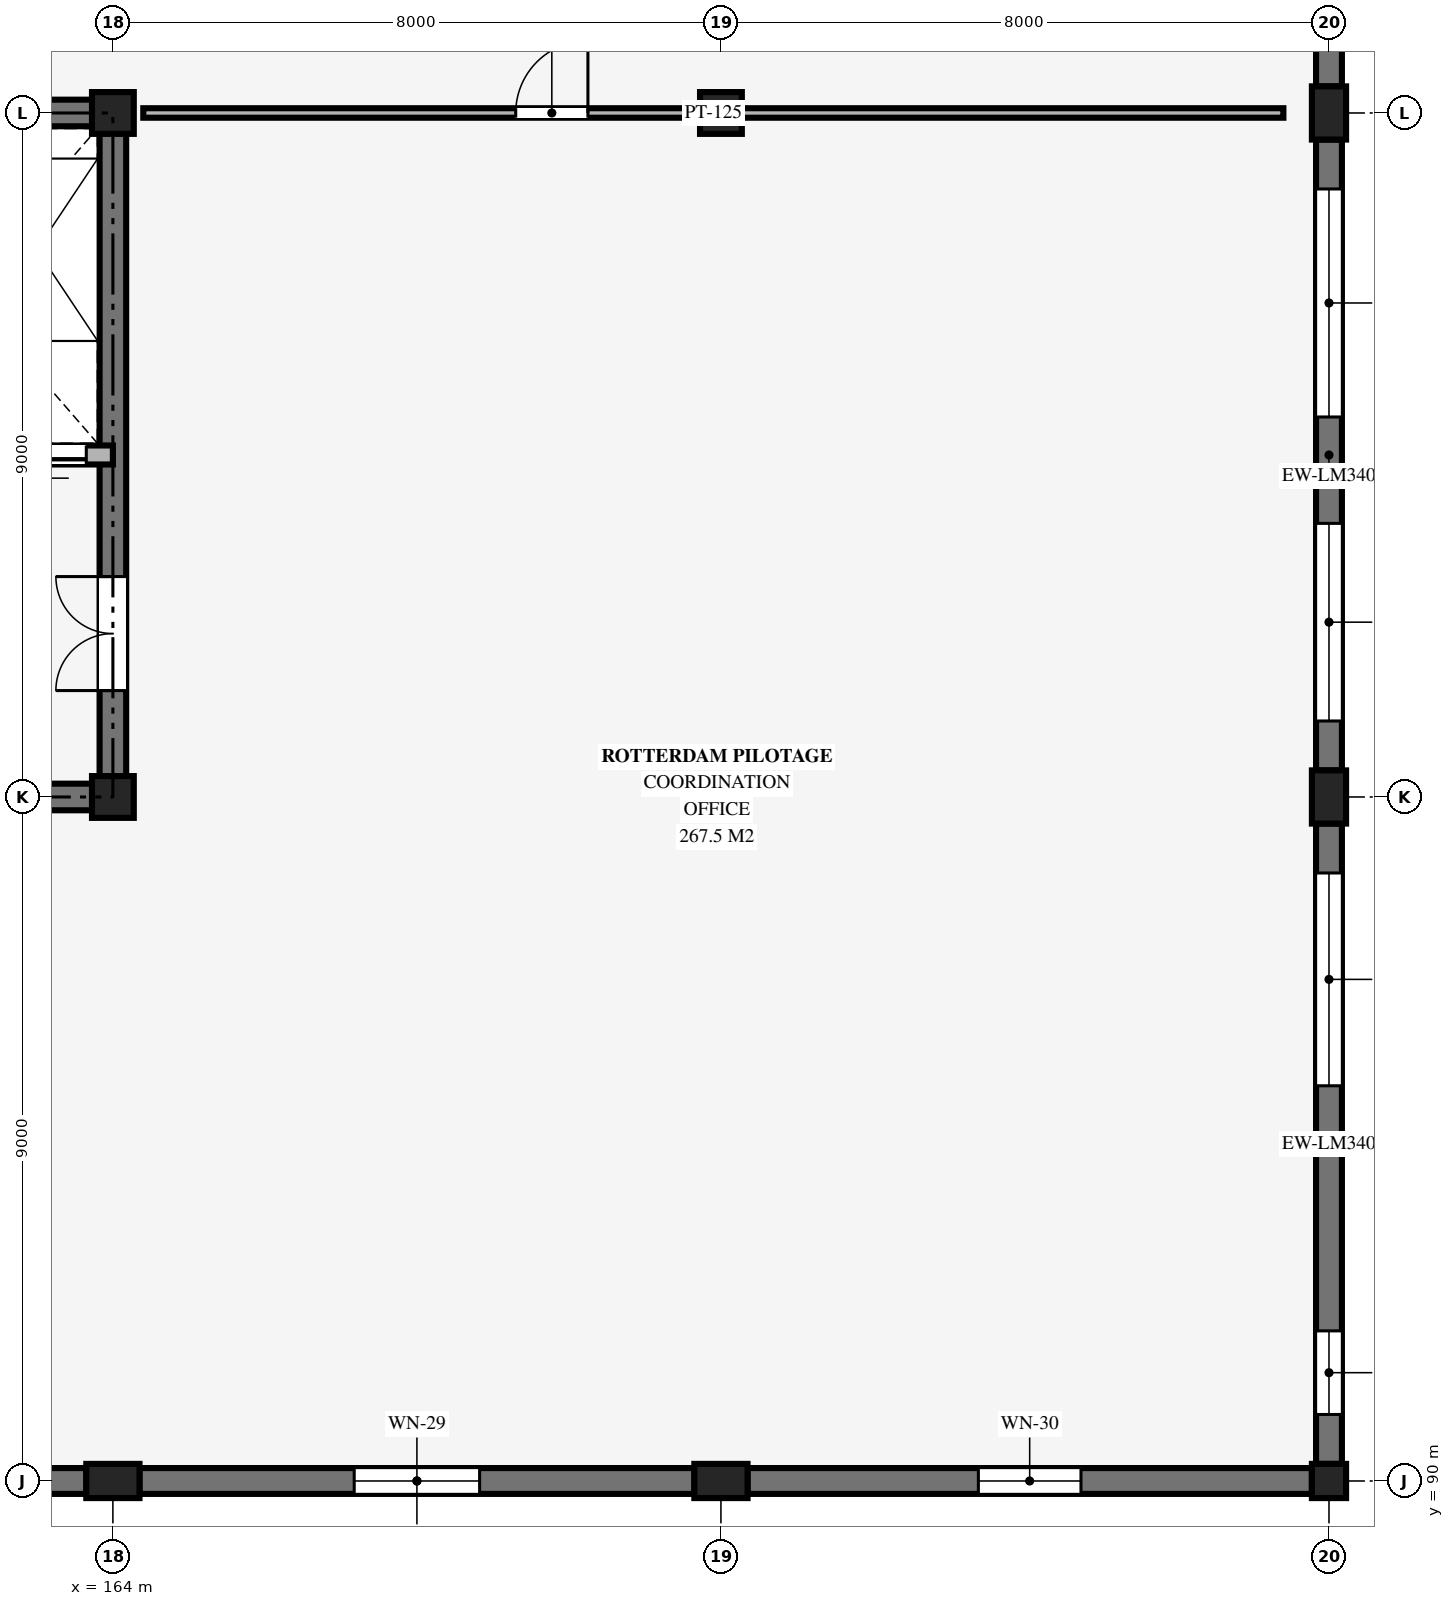
"""IFC4 building model, lengths in metres.
Left out: names, types, materials, properties, quantities, classifications, styles, units other than length and angle.
Written with IfcOpenShell. Run it as: python <this file> out.ifc"""

import sys

from ifc_helpers import new_model, si_unit, direction, frame, frame_2d, origin, origin_2d, place, context, subcontext, project, spatial, rectangle, extrude, element, fill, save


model = new_model("IFC4")
c1 = context("Model", 3, precision=1e-05, world=origin(), true_north=direction((0.0, 1.0)))
c2 = subcontext(c1, "Body", "Model", "MODEL_VIEW")
j1 = project(units=[si_unit("LENGTHUNIT", "METRE"), si_unit("PLANEANGLEUNIT", "RADIAN")], contexts=[c1])
p1 = place(None, origin())
s1 = spatial("IfcSite", under=j1, at=p1, CompositionType="ELEMENT")
p2 = place(p1, origin())
s2 = spatial("IfcBuilding", under=s1, at=p2, CompositionType="ELEMENT")
p3 = place(p2, frame((0.0, 0.0, 19.5)))
s3 = spatial("IfcBuildingStorey", under=s2, at=p3, CompositionType="ELEMENT", Elevation=19.5)
p4 = place(p3, frame((164.0, 90.0, 0.0), z_axis=(0.0, 0.0, 1.0), x_axis=(0.0, 1.0, 0.0)))
e1 = element("IfcColumn", 1, at=p4, inside=s3, PredefinedType="PILASTER", context=c2, shape_type="SweptSolid", body=[
    extrude(rectangle(XDim=0.45, YDim=0.7, at=origin_2d()), origin(), (0.0, 0.0, 1.0), 4.04),
])
for number, where, z_axis, x_axis in (
    (2, (164.0, 99.0, 0.0), (0.0, 0.0, 1.0), (1.0, 0.0, 0.0)),
    (3, (164.0, 108.0, 0.0), (0.0, 0.0, 1.0), (1.0, 0.0, 0.0)),
):
    element("IfcColumn", number, at=place(p3, frame(where, z_axis=z_axis, x_axis=x_axis)), inside=s3, PredefinedType="COLUMN", context=c2, shape_type="SweptSolid", body=[
        extrude(rectangle(XDim=0.55, YDim=0.55, at=origin_2d()), origin(), (0.0, 0.0, 1.0), 4.04),
    ])
p5 = place(p3, frame((172.0, 90.0, 0.0), z_axis=(0.0, 0.0, 1.0), x_axis=(0.0, 1.0, 0.0)))
e4 = element("IfcColumn", 4, at=p5, inside=s3, PredefinedType="PILASTER", context=c2, shape_type="SweptSolid", body=[
    extrude(rectangle(XDim=0.45, YDim=0.7, at=origin_2d()), origin(), (0.0, 0.0, 1.0), 4.04),
])
for number, where, z_axis, x_axis in (
    (5, (172.0, 99.0, 0.0), (0.0, 0.0, 1.0), (1.0, 0.0, 0.0)),
    (6, (172.0, 108.0, 0.0), (0.0, 0.0, 1.0), (1.0, 0.0, 0.0)),
):
    element("IfcColumn", number, at=place(p3, frame(where, z_axis=z_axis, x_axis=x_axis)), inside=s3, PredefinedType="COLUMN", context=c2, shape_type="SweptSolid", body=[
        extrude(rectangle(XDim=0.55, YDim=0.55, at=origin_2d()), origin(), (0.0, 0.0, 1.0), 4.04),
    ])
p6 = place(p3, frame((180.0, 90.0, 0.0), z_axis=(0.0, 0.0, 1.0), x_axis=(1.0, 0.0, 0.0)))
e7 = element("IfcColumn", 7, at=p6, inside=s3, PredefinedType="COLUMN", context=c2, shape_type="SweptSolid", body=[
    extrude(rectangle(XDim=0.45, YDim=0.45, at=origin_2d()), origin(), (0.0, 0.0, 1.0), 4.04),
])
for number, where, z_axis, x_axis in (
    (8, (180.0, 99.0, 0.0), (0.0, 0.0, 1.0), (1.0, 0.0, 0.0)),
    (9, (180.0, 108.0, 0.0), (0.0, 0.0, 1.0), (1.0, 0.0, 0.0)),
):
    element("IfcColumn", number, at=place(p3, frame(where, z_axis=z_axis, x_axis=x_axis)), inside=s3, PredefinedType="PILASTER", context=c2, shape_type="SweptSolid", body=[
        extrude(rectangle(XDim=0.45, YDim=0.7, at=origin_2d()), origin(), (0.0, 0.0, 1.0), 4.04),
    ])
p7 = place(p3, frame((180.0, 90.225, 0.0), z_axis=(0.0, 0.0, 1.0), x_axis=(0.0, 1.0, 0.0)))
e10 = element("IfcWall", 10, at=p7, inside=s3, PredefinedType="SOLIDWALL", context=c2, shape_type="SweptSolid", body=[
    extrude(rectangle(XDim=8.425, YDim=0.34, at=frame_2d((4.212, 0.0))), origin(), (0.0, 0.0, 1.0), 3.94),
])
p8 = place(p7, frame((0.65, 0.0, 0.95)))
e11 = element("IfcOpeningElement", 11, at=p8, cuts=e10, PredefinedType="OPENING", context=c2, shape_type="SweptSolid", body=[
    extrude(rectangle(XDim=1.1, YDim=1.1, at=frame_2d((0.55, 0.55))), frame((0.0, 0.18, 0.0), z_axis=(0.0, -1.0, 0.0), x_axis=(1.0, 0.0, 0.0)), (0.0, 0.0, 1.0), 0.36),
])
p9 = place(p7, frame((4.975, 0.0, 0.95)))
e12 = element("IfcOpeningElement", 12, at=p9, cuts=e10, PredefinedType="OPENING", context=c2, shape_type="SweptSolid", body=[
    extrude(rectangle(XDim=2.8, YDim=2.0, at=frame_2d((1.4, 1.0))), frame((0.0, 0.18, 0.0), z_axis=(0.0, -1.0, 0.0), x_axis=(1.0, 0.0, 0.0)), (0.0, 0.0, 1.0), 0.36),
])
p10 = place(p3, frame((180.0, 99.35, 0.0), z_axis=(0.0, 0.0, 1.0), x_axis=(0.0, 1.0, 0.0)))
e13 = element("IfcWall", 13, at=p10, inside=s3, PredefinedType="SOLIDWALL", context=c2, shape_type="SweptSolid", body=[
    extrude(rectangle(XDim=8.3, YDim=0.34, at=frame_2d((4.15, 0.0))), origin(), (0.0, 0.0, 1.0), 3.94),
])
p11 = place(p10, frame((0.65, 0.0, 0.95)))
e14 = element("IfcOpeningElement", 14, at=p11, cuts=e13, PredefinedType="OPENING", context=c2, shape_type="SweptSolid", body=[
    extrude(rectangle(XDim=2.6, YDim=1.6, at=frame_2d((1.3, 0.8))), frame((0.0, 0.18, 0.0), z_axis=(0.0, -1.0, 0.0), x_axis=(1.0, 0.0, 0.0)), (0.0, 0.0, 1.0), 0.36),
])
p12 = place(p10, frame((4.65, 0.0, 0.95)))
e15 = element("IfcOpeningElement", 15, at=p12, cuts=e13, PredefinedType="OPENING", context=c2, shape_type="SweptSolid", body=[
    extrude(rectangle(XDim=3.0, YDim=1.4, at=frame_2d((1.5, 0.7))), frame((0.0, 0.18, 0.0), z_axis=(0.0, -1.0, 0.0), x_axis=(1.0, 0.0, 0.0)), (0.0, 0.0, 1.0), 0.36),
])
p13 = place(p3, frame((180.0, 108.35, 0.0), z_axis=(0.0, 0.0, 1.0), x_axis=(0.0, 1.0, 0.0)))
e16 = element("IfcWall", 16, at=p13, inside=s3, PredefinedType="SOLIDWALL", context=c2, shape_type="SweptSolid", body=[
    extrude(rectangle(XDim=8.3, YDim=0.34, at=frame_2d((4.15, 0.0))), origin(), (0.0, 0.0, 1.0), 3.94),
])
p14 = place(p13, frame((0.65, 0.0, 0.95)))
e17 = element("IfcOpeningElement", 17, at=p14, cuts=e16, PredefinedType="OPENING", context=c2, shape_type="SweptSolid", body=[
    extrude(rectangle(XDim=2.0, YDim=1.2, at=frame_2d((1.0, 0.6))), frame((0.0, 0.18, 0.0), z_axis=(0.0, -1.0, 0.0), x_axis=(1.0, 0.0, 0.0)), (0.0, 0.0, 1.0), 0.36),
])
p15 = place(p13, frame((6.05, 0.0, 0.95)))
e18 = element("IfcOpeningElement", 18, at=p15, cuts=e16, PredefinedType="OPENING", context=c2, shape_type="SweptSolid", body=[
    extrude(rectangle(XDim=1.6, YDim=2.0, at=frame_2d((0.8, 1.0))), frame((0.0, 0.18, 0.0), z_axis=(0.0, -1.0, 0.0), x_axis=(1.0, 0.0, 0.0)), (0.0, 0.0, 1.0), 0.36),
])
p16 = place(p3, frame((163.65, 90.0, 0.0), z_axis=(0.0, 0.0, 1.0), x_axis=(-1.0, 0.0, 0.0)))
e19 = element("IfcWall", 19, at=p16, inside=s3, PredefinedType="SOLIDWALL", context=c2, shape_type="SweptSolid", body=[
    extrude(rectangle(XDim=7.3, YDim=0.34, at=frame_2d((3.65, 0.0))), origin(), (0.0, 0.0, 1.0), 3.94),
])
p17 = place(p16, frame((2.5, 0.0, 1.0)))
e20 = element("IfcOpeningElement", 20, at=p17, cuts=e19, PredefinedType="OPENING", context=c2, shape_type="SweptSolid", body=[
    extrude(rectangle(XDim=2.3, YDim=1.5, at=frame_2d((1.15, 0.75))), frame((0.0, 0.18, 0.0), z_axis=(0.0, -1.0, 0.0), x_axis=(1.0, 0.0, 0.0)), (0.0, 0.0, 1.0), 0.36),
])
p18 = place(p3, frame((171.65, 90.0, 0.0), z_axis=(0.0, 0.0, 1.0), x_axis=(-1.0, 0.0, 0.0)))
e21 = element("IfcWall", 21, at=p18, inside=s3, PredefinedType="SOLIDWALL", context=c2, shape_type="SweptSolid", body=[
    extrude(rectangle(XDim=7.3, YDim=0.34, at=frame_2d((3.65, 0.0))), origin(), (0.0, 0.0, 1.0), 3.94),
])
p19 = place(p18, frame((2.825, 0.0, 1.0)))
e22 = element("IfcOpeningElement", 22, at=p19, cuts=e21, PredefinedType="OPENING", context=c2, shape_type="SweptSolid", body=[
    extrude(rectangle(XDim=1.65, YDim=1.35, at=frame_2d((0.825, 0.675))), frame((0.0, 0.18, 0.0), z_axis=(0.0, -1.0, 0.0), x_axis=(1.0, 0.0, 0.0)), (0.0, 0.0, 1.0), 0.36),
])
p20 = place(p3, frame((179.775, 90.0, 0.0), z_axis=(0.0, 0.0, 1.0), x_axis=(-1.0, 0.0, 0.0)))
e23 = element("IfcWall", 23, at=p20, inside=s3, PredefinedType="SOLIDWALL", context=c2, shape_type="SweptSolid", body=[
    extrude(rectangle(XDim=7.425, YDim=0.34, at=frame_2d((3.712, 0.0))), origin(), (0.0, 0.0, 1.0), 3.94),
])
p21 = place(p20, frame((3.038, 0.0, 1.0)))
e24 = element("IfcOpeningElement", 24, at=p21, cuts=e23, PredefinedType="OPENING", context=c2, shape_type="SweptSolid", body=[
    extrude(rectangle(XDim=1.35, YDim=1.65, at=frame_2d((0.675, 0.825))), frame((0.0, 0.18, 0.0), z_axis=(0.0, -1.0, 0.0), x_axis=(1.0, 0.0, 0.0)), (0.0, 0.0, 1.0), 0.36),
])
for number, where, z_axis, x_axis in (
    (25, (156.0, 99.0, 0.0), (0.0, 0.0, 1.0), (1.0, 0.0, 0.0)),
    (26, (156.0, 108.0, 0.0), (0.0, 0.0, 1.0), (1.0, 0.0, 0.0)),
):
    element("IfcWall", number, at=place(p3, frame(where, z_axis=z_axis, x_axis=x_axis)), inside=s3, PredefinedType="SHEAR", context=c2, shape_type="SweptSolid", body=[
        extrude(rectangle(XDim=8.0, YDim=0.35, at=frame_2d((4.0, 0.0))), origin(), (0.0, 0.0, 1.0), 4.18),
    ])
p22 = place(p3, frame((164.0, 99.0, 0.0), z_axis=(0.0, 0.0, 1.0), x_axis=(0.0, 1.0, 0.0)))
e27 = element("IfcWall", 27, at=p22, inside=s3, PredefinedType="SHEAR", context=c2, shape_type="SweptSolid", body=[
    extrude(rectangle(XDim=9.0, YDim=0.35, at=frame_2d((4.5, 0.0))), origin(), (0.0, 0.0, 1.0), 4.18),
])
p23 = place(p22, frame((1.4, 0.0, 0.0)))
e28 = element("IfcOpeningElement", 28, at=p23, cuts=e27, PredefinedType="OPENING", context=c2, shape_type="SweptSolid", body=[
    extrude(rectangle(XDim=1.5, YDim=2.2, at=frame_2d((0.75, 1.1))), frame((0.0, 0.185, 0.0), z_axis=(0.0, -1.0, 0.0), x_axis=(1.0, 0.0, 0.0)), (0.0, 0.0, 1.0), 0.37),
])
p24 = place(p3, frame((164.0, 103.5, 0.0), z_axis=(0.0, 0.0, 1.0), x_axis=(-1.0, 0.0, 0.0)))
e29 = element("IfcWall", 29, at=p24, inside=s3, PredefinedType="SOLIDWALL", context=c2, shape_type="SweptSolid", body=[
    extrude(rectangle(XDim=4.0, YDim=0.25, at=frame_2d((2.0, 0.0))), origin(), (0.0, 0.0, 1.0), 3.2),
])
p25 = place(p24, frame((0.35, 0.0, 0.0)))
e30 = element("IfcOpeningElement", 30, at=p25, cuts=e29, PredefinedType="OPENING", context=c2, shape_type="SweptSolid", body=[
    extrude(rectangle(XDim=1.3, YDim=2.25, at=frame_2d((0.65, 1.125))), frame((0.0, 0.135, 0.0), z_axis=(0.0, -1.0, 0.0), x_axis=(1.0, 0.0, 0.0)), (0.0, 0.0, 1.0), 0.27),
])
p26 = place(p24, frame((2.25, 0.0, 0.0)))
e31 = element("IfcOpeningElement", 31, at=p26, cuts=e29, PredefinedType="OPENING", context=c2, shape_type="SweptSolid", body=[
    extrude(rectangle(XDim=1.2, YDim=2.2, at=frame_2d((0.6, 1.1))), frame((0.0, 0.135, 0.0), z_axis=(0.0, -1.0, 0.0), x_axis=(1.0, 0.0, 0.0)), (0.0, 0.0, 1.0), 0.27),
])
p27 = place(p3, frame((164.4, 108.0, 0.0), z_axis=(0.0, 0.0, 1.0), x_axis=(1.0, 0.0, 0.0)))
e32 = element("IfcWall", 32, at=p27, inside=s3, PredefinedType="PARTITIONING", context=c2, shape_type="SweptSolid", body=[
    extrude(rectangle(XDim=15.0, YDim=0.125, at=frame_2d((7.5, 0.0))), origin(), (0.0, 0.0, 1.0), 3.2),
])
p28 = place(p27, frame((4.9, 0.0, 0.0)))
e33 = element("IfcOpeningElement", 33, at=p28, cuts=e32, PredefinedType="OPENING", context=c2, shape_type="SweptSolid", body=[
    extrude(rectangle(XDim=0.95, YDim=2.1, at=frame_2d((0.475, 1.05))), frame((0.0, 0.073, 0.0), z_axis=(0.0, -1.0, 0.0), x_axis=(1.0, 0.0, 0.0)), (0.0, 0.0, 1.0), 0.145),
])
p29 = place(p8, origin())
e34 = element("IfcWindow", 34, at=p29, inside=s3, PartitioningType="SINGLE_PANEL", PredefinedType="WINDOW", context=c2, shape_type="SweptSolid", body=[
    extrude(rectangle(XDim=1.1, YDim=1.1, at=frame_2d((0.55, 0.55))), frame((0.0, 0.03, 0.0), z_axis=(0.0, -1.0, 0.0), x_axis=(1.0, 0.0, 0.0)), (0.0, 0.0, 1.0), 0.06),
])
fill(e11, e34)
p30 = place(p9, origin())
e35 = element("IfcWindow", 35, at=p30, inside=s3, PartitioningType="SINGLE_PANEL", PredefinedType="WINDOW", context=c2, shape_type="SweptSolid", body=[
    extrude(rectangle(XDim=2.8, YDim=2.0, at=frame_2d((1.4, 1.0))), frame((0.0, 0.03, 0.0), z_axis=(0.0, -1.0, 0.0), x_axis=(1.0, 0.0, 0.0)), (0.0, 0.0, 1.0), 0.06),
])
fill(e12, e35)
p31 = place(p11, origin())
e36 = element("IfcWindow", 36, at=p31, inside=s3, PartitioningType="SINGLE_PANEL", PredefinedType="WINDOW", context=c2, shape_type="SweptSolid", body=[
    extrude(rectangle(XDim=2.6, YDim=1.6, at=frame_2d((1.3, 0.8))), frame((0.0, 0.03, 0.0), z_axis=(0.0, -1.0, 0.0), x_axis=(1.0, 0.0, 0.0)), (0.0, 0.0, 1.0), 0.06),
])
fill(e14, e36)
p32 = place(p12, origin())
e37 = element("IfcWindow", 37, at=p32, inside=s3, PartitioningType="SINGLE_PANEL", PredefinedType="WINDOW", context=c2, shape_type="SweptSolid", body=[
    extrude(rectangle(XDim=3.0, YDim=1.4, at=frame_2d((1.5, 0.7))), frame((0.0, 0.03, 0.0), z_axis=(0.0, -1.0, 0.0), x_axis=(1.0, 0.0, 0.0)), (0.0, 0.0, 1.0), 0.06),
])
fill(e15, e37)
p33 = place(p19, origin())
e38 = element("IfcWindow", 38, at=p33, inside=s3, PartitioningType="SINGLE_PANEL", PredefinedType="WINDOW", context=c2, shape_type="SweptSolid", body=[
    extrude(rectangle(XDim=1.65, YDim=1.35, at=frame_2d((0.825, 0.675))), frame((0.0, 0.03, 0.0), z_axis=(0.0, -1.0, 0.0), x_axis=(1.0, 0.0, 0.0)), (0.0, 0.0, 1.0), 0.06),
])
fill(e22, e38)
p34 = place(p21, origin())
e39 = element("IfcWindow", 39, at=p34, inside=s3, PartitioningType="SINGLE_PANEL", PredefinedType="WINDOW", context=c2, shape_type="SweptSolid", body=[
    extrude(rectangle(XDim=1.35, YDim=1.65, at=frame_2d((0.675, 0.825))), frame((0.0, 0.03, 0.0), z_axis=(0.0, -1.0, 0.0), x_axis=(1.0, 0.0, 0.0)), (0.0, 0.0, 1.0), 0.06),
])
fill(e24, e39)
p35 = place(p25, origin())
e40 = element("IfcDoor", 40, at=p35, inside=s3, OperationType="DOUBLE_DOOR_SLIDING", PredefinedType="USERDEFINED", context=c2, shape_type="SweptSolid", body=[
    extrude(rectangle(XDim=1.3, YDim=2.25, at=frame_2d((0.65, 1.125))), frame((0.0, 0.025, 0.0), z_axis=(0.0, -1.0, 0.0), x_axis=(1.0, 0.0, 0.0)), (0.0, 0.0, 1.0), 0.05),
])
fill(e30, e40)
p36 = place(p23, origin())
e41 = element("IfcDoor", 41, at=p36, inside=s3, OperationType="DOUBLE_DOOR_SINGLE_SWING", PredefinedType="DOOR", context=c2, shape_type="SweptSolid", body=[
    extrude(rectangle(XDim=1.5, YDim=2.2, at=frame_2d((0.75, 1.1))), frame((0.0, 0.025, 0.0), z_axis=(0.0, -1.0, 0.0), x_axis=(1.0, 0.0, 0.0)), (0.0, 0.0, 1.0), 0.05),
])
fill(e28, e41)
p37 = place(p28, origin())
e42 = element("IfcDoor", 42, at=p37, inside=s3, OperationType="SINGLE_SWING_RIGHT", PredefinedType="DOOR", context=c2, shape_type="SweptSolid", body=[
    extrude(rectangle(XDim=0.95, YDim=2.1, at=frame_2d((0.475, 1.05))), frame((0.0, 0.025, 0.0), z_axis=(0.0, -1.0, 0.0), x_axis=(1.0, 0.0, 0.0)), (0.0, 0.0, 1.0), 0.05),
])
fill(e33, e42)
save(model, sys.argv[1])
